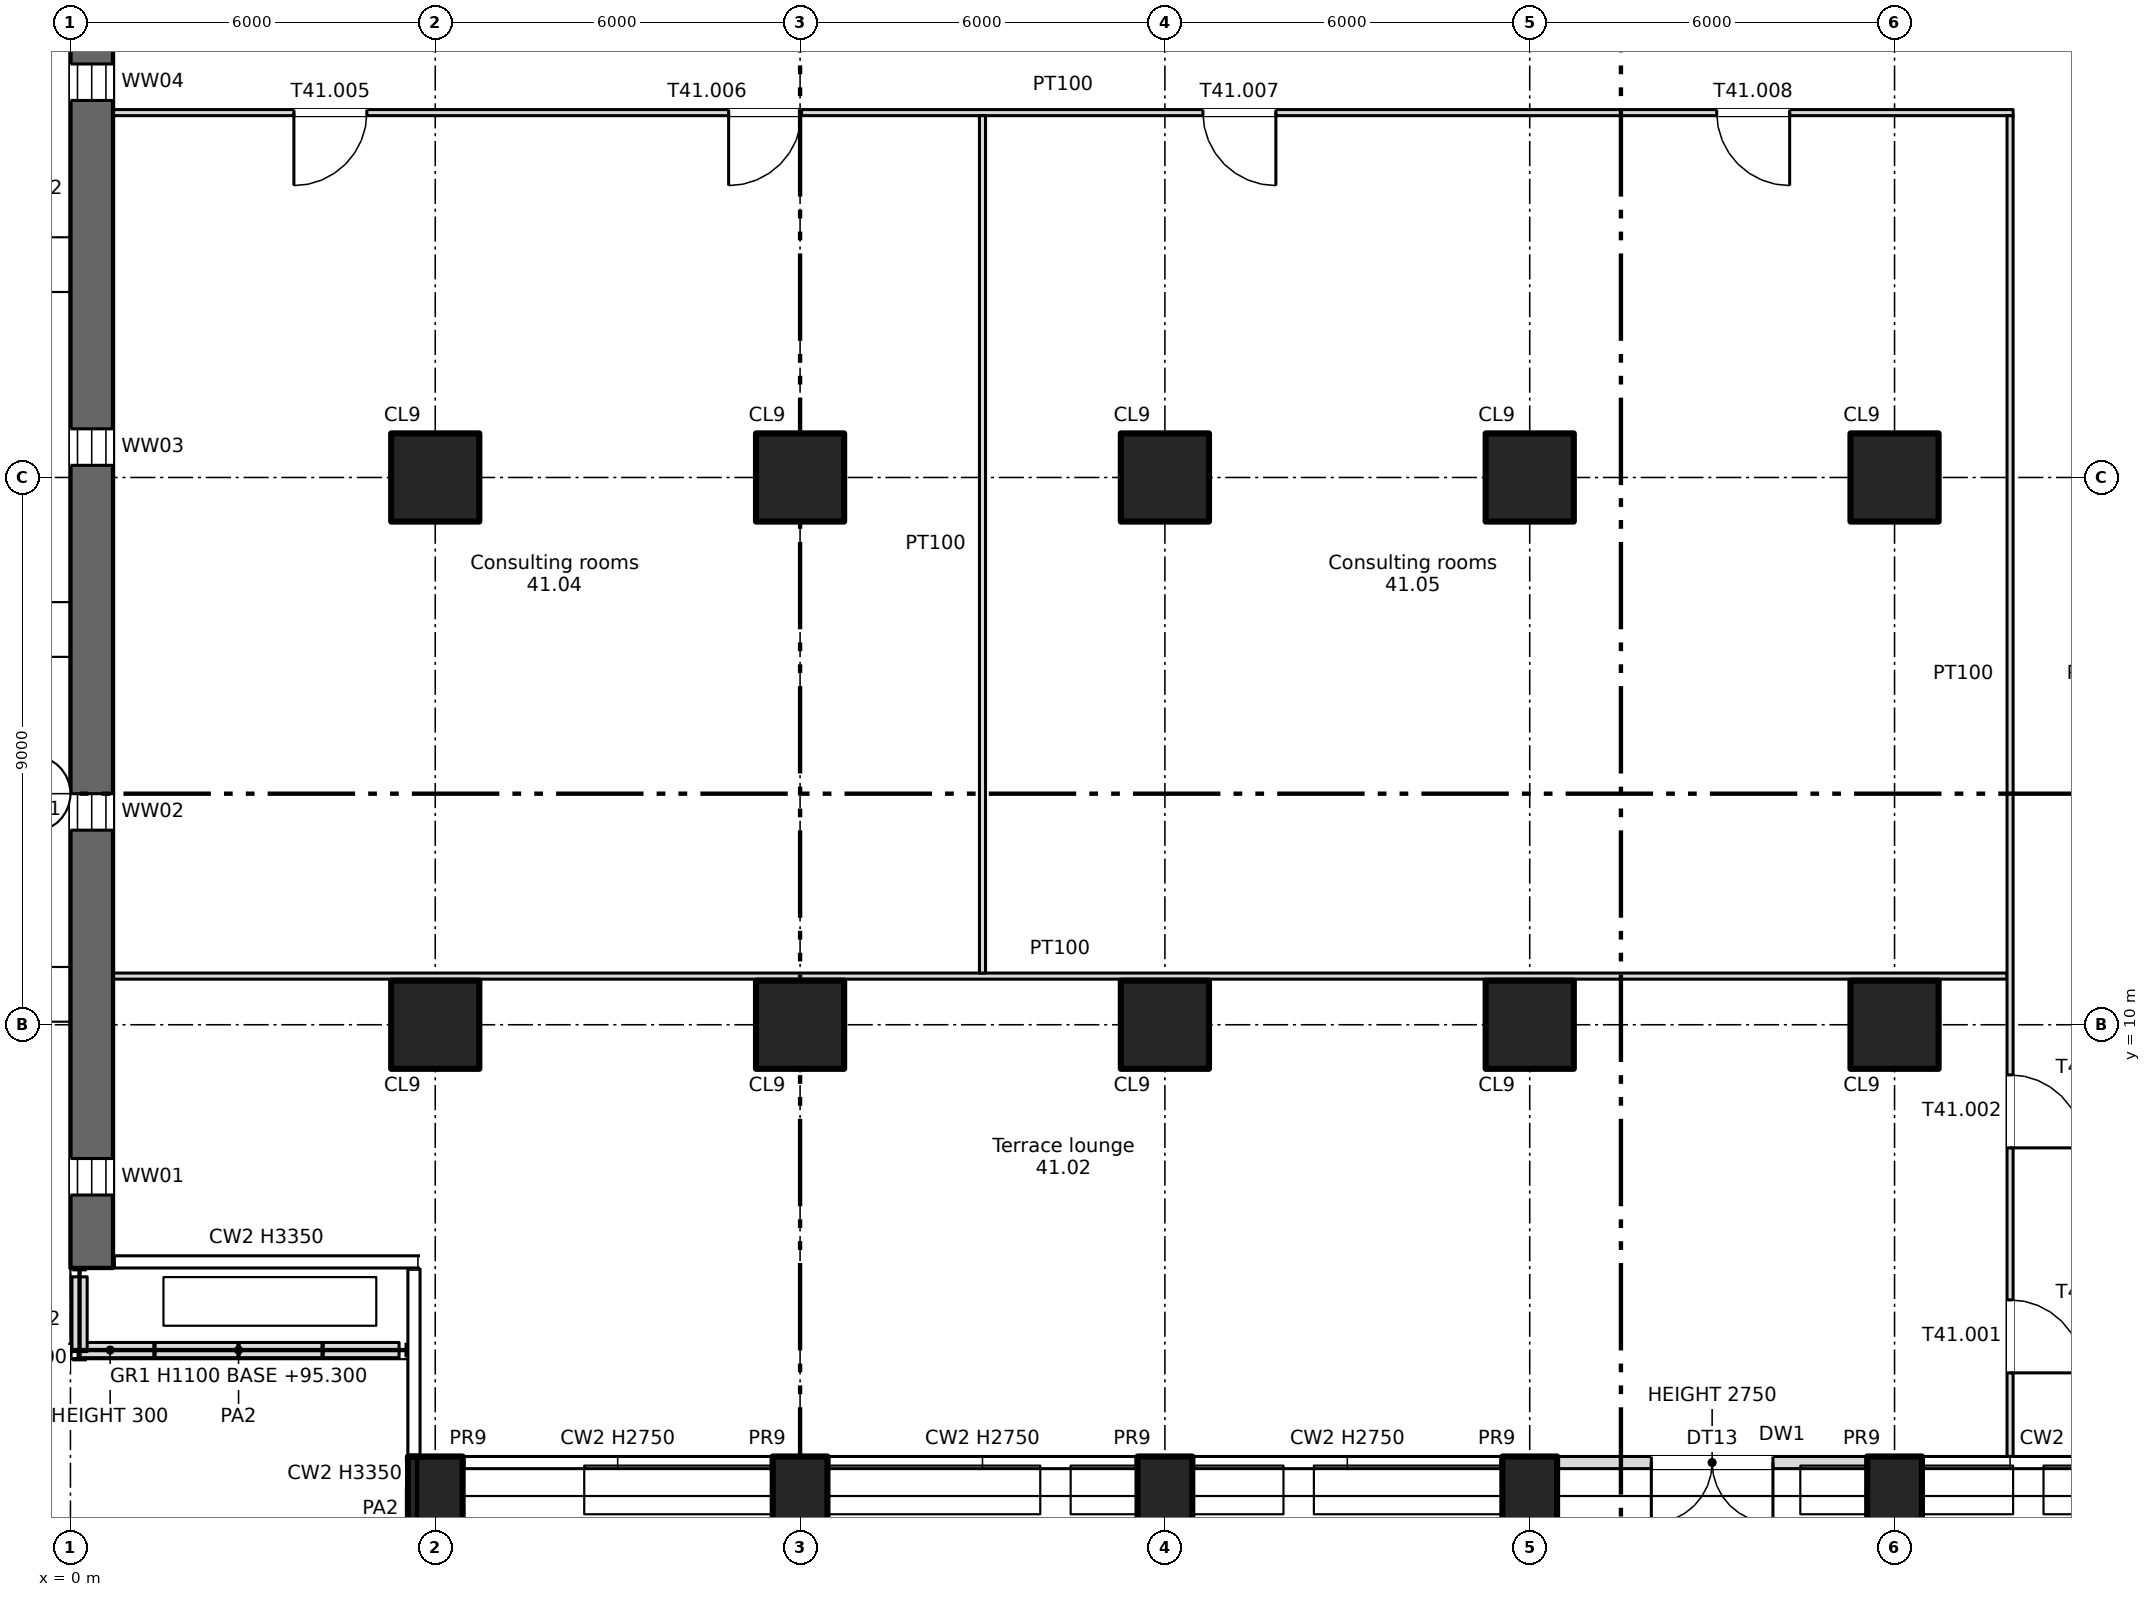
"""IFC4 building model, lengths in metres.
Left out: names, types, materials, properties, quantities, classifications, styles, units other than length and angle.
Written with IfcOpenShell. Run it as: python <this file> out.ifc"""

import sys

from ifc_helpers import new_model, si_unit, direction, frame, frame_2d, origin, origin_2d, place, context, subcontext, project, spatial, rectangle, extrude, element, fill, save


model = new_model("IFC4")
c1 = context("Model", 3, precision=1e-05, world=origin(), true_north=direction((0.0, 1.0)))
c2 = subcontext(c1, "Body", "Model", "MODEL_VIEW")
j1 = project(units=[si_unit("LENGTHUNIT", "METRE"), si_unit("PLANEANGLEUNIT", "RADIAN")], contexts=[c1])
p1 = place(None, origin())
s1 = spatial("IfcSite", under=j1, at=p1, CompositionType="ELEMENT")
p2 = place(p1, origin())
s2 = spatial("IfcBuilding", under=s1, at=p2, CompositionType="ELEMENT")
p3 = place(p2, frame((0.0, 0.0, 95.0)))
s3 = spatial("IfcBuildingStorey", under=s2, at=p3, CompositionType="ELEMENT", Elevation=95.0)
for number, where, z_axis, x_axis in (
    (1, (6.0, 2.2, 0.0), (0.0, 0.0, 1.0), (1.0, 0.0, 0.0)),
    (2, (12.0, 2.2, 0.0), (0.0, 0.0, 1.0), (1.0, 0.0, 0.0)),
    (3, (18.0, 2.2, 0.0), (0.0, 0.0, 1.0), (1.0, 0.0, 0.0)),
    (4, (24.0, 2.2, 0.0), (0.0, 0.0, 1.0), (1.0, 0.0, 0.0)),
    (5, (30.0, 2.2, 0.0), (0.0, 0.0, 1.0), (1.0, 0.0, 0.0)),
):
    element("IfcColumn", number, at=place(p3, frame(where, z_axis=z_axis, x_axis=x_axis)), inside=s3, PredefinedType="COLUMN", context=c2, shape_type="SweptSolid", body=[
        extrude(rectangle(XDim=0.9, YDim=1.4, at=origin_2d()), origin(), (0.0, 0.0, 1.0), 3.35),
    ])
for number, where, z_axis, x_axis in (
    (6, (6.0, 10.0, 0.0), (0.0, 0.0, 1.0), (1.0, 0.0, 0.0)),
    (7, (6.0, 19.0, 0.0), (0.0, 0.0, 1.0), (1.0, 0.0, 0.0)),
    (8, (12.0, 10.0, 0.0), (0.0, 0.0, 1.0), (1.0, 0.0, 0.0)),
    (9, (12.0, 19.0, 0.0), (0.0, 0.0, 1.0), (1.0, 0.0, 0.0)),
    (10, (18.0, 10.0, 0.0), (0.0, 0.0, 1.0), (1.0, 0.0, 0.0)),
    (11, (18.0, 19.0, 0.0), (0.0, 0.0, 1.0), (1.0, 0.0, 0.0)),
    (12, (24.0, 10.0, 0.0), (0.0, 0.0, 1.0), (1.0, 0.0, 0.0)),
    (13, (24.0, 19.0, 0.0), (0.0, 0.0, 1.0), (1.0, 0.0, 0.0)),
    (14, (30.0, 10.0, 0.0), (0.0, 0.0, 1.0), (1.0, 0.0, 0.0)),
    (15, (30.0, 19.0, 0.0), (0.0, 0.0, 1.0), (1.0, 0.0, 0.0)),
):
    element("IfcColumn", number, at=place(p3, frame(where, z_axis=z_axis, x_axis=x_axis)), inside=s3, PredefinedType="COLUMN", context=c2, shape_type="SweptSolid", body=[
        extrude(rectangle(XDim=1.45, YDim=1.45, at=origin_2d()), origin(), (0.0, 0.0, 1.0), 3.35),
    ])
p4 = place(p3, frame((0.35, 6.0, 0.0), z_axis=(0.0, 0.0, 1.0), x_axis=(0.0, 1.0, 0.0)))
e16 = element("IfcWall", 16, at=p4, inside=s3, PredefinedType="SHEAR", context=c2, shape_type="SweptSolid", body=[
    extrude(rectangle(XDim=35.5, YDim=0.7, at=frame_2d((17.75, 0.0))), origin(), (0.0, 0.0, 1.0), 3.35),
])
p5 = place(p4, frame((1.2, 0.0, 0.6)))
e17 = element("IfcOpeningElement", 17, at=p5, cuts=e16, PredefinedType="OPENING", context=c2, shape_type="SweptSolid", body=[
    extrude(rectangle(XDim=0.6, YDim=2.4, at=frame_2d((0.3, 1.2))), frame((0.0, 0.36, 0.0), z_axis=(0.0, -1.0, 0.0), x_axis=(1.0, 0.0, 0.0)), (0.0, 0.0, 1.0), 0.72),
])
p6 = place(p4, frame((7.2, 0.0, 0.6)))
e18 = element("IfcOpeningElement", 18, at=p6, cuts=e16, PredefinedType="OPENING", context=c2, shape_type="SweptSolid", body=[
    extrude(rectangle(XDim=0.6, YDim=2.4, at=frame_2d((0.3, 1.2))), frame((0.0, 0.36, 0.0), z_axis=(0.0, -1.0, 0.0), x_axis=(1.0, 0.0, 0.0)), (0.0, 0.0, 1.0), 0.72),
])
p7 = place(p4, frame((13.2, 0.0, 0.6)))
e19 = element("IfcOpeningElement", 19, at=p7, cuts=e16, PredefinedType="OPENING", context=c2, shape_type="SweptSolid", body=[
    extrude(rectangle(XDim=0.6, YDim=2.4, at=frame_2d((0.3, 1.2))), frame((0.0, 0.36, 0.0), z_axis=(0.0, -1.0, 0.0), x_axis=(1.0, 0.0, 0.0)), (0.0, 0.0, 1.0), 0.72),
])
p8 = place(p4, frame((19.2, 0.0, 0.6)))
e20 = element("IfcOpeningElement", 20, at=p8, cuts=e16, PredefinedType="OPENING", context=c2, shape_type="SweptSolid", body=[
    extrude(rectangle(XDim=0.6, YDim=2.4, at=frame_2d((0.3, 1.2))), frame((0.0, 0.36, 0.0), z_axis=(0.0, -1.0, 0.0), x_axis=(1.0, 0.0, 0.0)), (0.0, 0.0, 1.0), 0.72),
])
p9 = place(p4, frame((25.2, 0.0, 0.6)))
e21 = element("IfcOpeningElement", 21, at=p9, cuts=e16, PredefinedType="OPENING", context=c2, shape_type="SweptSolid", body=[
    extrude(rectangle(XDim=0.6, YDim=2.4, at=frame_2d((0.3, 1.2))), frame((0.0, 0.36, 0.0), z_axis=(0.0, -1.0, 0.0), x_axis=(1.0, 0.0, 0.0)), (0.0, 0.0, 1.0), 0.72),
])
p10 = place(p4, frame((31.2, 0.0, 0.6)))
e22 = element("IfcOpeningElement", 22, at=p10, cuts=e16, PredefinedType="OPENING", context=c2, shape_type="SweptSolid", body=[
    extrude(rectangle(XDim=0.6, YDim=2.4, at=frame_2d((0.3, 1.2))), frame((0.0, 0.36, 0.0), z_axis=(0.0, -1.0, 0.0), x_axis=(1.0, 0.0, 0.0)), (0.0, 0.0, 1.0), 0.72),
])
p11 = place(p3, frame((24.45, 2.8, 0.0), z_axis=(0.0, 0.0, 1.0), x_axis=(1.0, 0.0, 0.0)))
e23 = element("IfcWall", 23, at=p11, inside=s3, PredefinedType="SOLIDWALL", context=c2, shape_type="SweptSolid", body=[
    extrude(rectangle(XDim=5.1, YDim=0.2, at=frame_2d((2.55, 0.0))), origin(), (0.0, 0.0, 1.0), 2.75),
])
p12 = place(p11, frame((1.55, 0.0, 0.0)))
e24 = element("IfcOpeningElement", 24, at=p12, cuts=e23, PredefinedType="OPENING", context=c2, shape_type="SweptSolid", body=[
    extrude(rectangle(XDim=2.0, YDim=2.4, at=frame_2d((1.0, 1.2))), frame((0.0, 0.11, 0.0), z_axis=(0.0, -1.0, 0.0), x_axis=(1.0, 0.0, 0.0)), (0.0, 0.0, 1.0), 0.22),
])
p13 = place(p3, frame((5.405, 4.65, 0.0), z_axis=(0.0, 0.0, 1.0), x_axis=(-1.0, 0.0, 0.0)))
e25 = element("IfcWall", 25, at=p13, inside=s3, PredefinedType="PARAPET", context=c2, shape_type="SweptSolid", body=[
    extrude(rectangle(XDim=5.28, YDim=0.25, at=frame_2d((2.64, 0.0))), origin(), (0.0, 0.0, 1.0), 0.3),
])
for number, where, z_axis, x_axis in (
    (26, (0.15, 4.625, 0.0), (0.0, 0.0, 1.0), (0.0, 1.0, 0.0)),
    (27, (5.7, 1.525, 0.0), (0.0, 0.0, 1.0), (0.0, 1.0, 0.0)),
):
    element("IfcWall", number, at=place(p3, frame(where, z_axis=z_axis, x_axis=x_axis)), inside=s3, PredefinedType="PARAPET", context=c2, shape_type="SweptSolid", body=[
        extrude(rectangle(XDim=1.23, YDim=0.25, at=frame_2d((0.615, 0.0))), origin(), (0.0, 0.0, 1.0), 0.3),
    ])
p14 = place(p3, frame((0.7, 10.8, 0.0), z_axis=(0.0, 0.0, 1.0), x_axis=(1.0, 0.0, 0.0)))
e28 = element("IfcWall", 28, at=p14, inside=s3, PredefinedType="PARTITIONING", context=c2, shape_type="SweptSolid", body=[
    extrude(rectangle(XDim=31.15, YDim=0.1, at=frame_2d((15.575, 0.0))), origin(), (0.0, 0.0, 1.0), 3.35),
])
p15 = place(p3, frame((0.7, 25.0, 0.0), z_axis=(0.0, 0.0, 1.0), x_axis=(1.0, 0.0, 0.0)))
e29 = element("IfcWall", 29, at=p15, inside=s3, PredefinedType="PARTITIONING", context=c2, shape_type="SweptSolid", body=[
    extrude(rectangle(XDim=31.25, YDim=0.1, at=frame_2d((15.625, 0.0))), origin(), (0.0, 0.0, 1.0), 3.35),
])
p16 = place(p15, frame((2.975, 0.0, 0.0)))
e30 = element("IfcOpeningElement", 30, at=p16, cuts=e29, PredefinedType="OPENING", context=c2, shape_type="SweptSolid", body=[
    extrude(rectangle(XDim=1.2, YDim=2.1, at=frame_2d((0.6, 1.05))), frame((0.0, 0.06, 0.0), z_axis=(0.0, -1.0, 0.0), x_axis=(1.0, 0.0, 0.0)), (0.0, 0.0, 1.0), 0.12),
])
p17 = place(p15, frame((10.125, 0.0, 0.0)))
e31 = element("IfcOpeningElement", 31, at=p17, cuts=e29, PredefinedType="OPENING", context=c2, shape_type="SweptSolid", body=[
    extrude(rectangle(XDim=1.2, YDim=2.1, at=frame_2d((0.6, 1.05))), frame((0.0, 0.06, 0.0), z_axis=(0.0, -1.0, 0.0), x_axis=(1.0, 0.0, 0.0)), (0.0, 0.0, 1.0), 0.12),
])
p18 = place(p15, frame((17.925, 0.0, 0.0)))
e32 = element("IfcOpeningElement", 32, at=p18, cuts=e29, PredefinedType="OPENING", context=c2, shape_type="SweptSolid", body=[
    extrude(rectangle(XDim=1.2, YDim=2.1, at=frame_2d((0.6, 1.05))), frame((0.0, 0.06, 0.0), z_axis=(0.0, -1.0, 0.0), x_axis=(1.0, 0.0, 0.0)), (0.0, 0.0, 1.0), 0.12),
])
p19 = place(p15, frame((26.375, 0.0, 0.0)))
e33 = element("IfcOpeningElement", 33, at=p19, cuts=e29, PredefinedType="OPENING", context=c2, shape_type="SweptSolid", body=[
    extrude(rectangle(XDim=1.2, YDim=2.1, at=frame_2d((0.6, 1.05))), frame((0.0, 0.06, 0.0), z_axis=(0.0, -1.0, 0.0), x_axis=(1.0, 0.0, 0.0)), (0.0, 0.0, 1.0), 0.12),
])
p20 = place(p3, frame((15.0, 10.85, 0.0), z_axis=(0.0, 0.0, 1.0), x_axis=(0.0, 1.0, 0.0)))
e34 = element("IfcWall", 34, at=p20, inside=s3, PredefinedType="PARTITIONING", context=c2, shape_type="SweptSolid", body=[
    extrude(rectangle(XDim=14.1, YDim=0.1, at=frame_2d((7.05, 0.0))), origin(), (0.0, 0.0, 1.0), 3.35),
])
p21 = place(p3, frame((31.9, 2.9, 0.0), z_axis=(0.0, 0.0, 1.0), x_axis=(0.0, 1.0, 0.0)))
e35 = element("IfcWall", 35, at=p21, inside=s3, PredefinedType="PARTITIONING", context=c2, shape_type="SweptSolid", body=[
    extrude(rectangle(XDim=22.05, YDim=0.1, at=frame_2d((11.025, 0.0))), origin(), (0.0, 0.0, 1.0), 3.35),
])
p22 = place(p21, frame((1.375, 0.0, 0.0)))
e36 = element("IfcOpeningElement", 36, at=p22, cuts=e35, PredefinedType="OPENING", context=c2, shape_type="SweptSolid", body=[
    extrude(rectangle(XDim=1.2, YDim=2.1, at=frame_2d((0.6, 1.05))), frame((0.0, 0.06, 0.0), z_axis=(0.0, -1.0, 0.0), x_axis=(1.0, 0.0, 0.0)), (0.0, 0.0, 1.0), 0.12),
])
p23 = place(p21, frame((5.075, 0.0, 0.0)))
e37 = element("IfcOpeningElement", 37, at=p23, cuts=e35, PredefinedType="OPENING", context=c2, shape_type="SweptSolid", body=[
    extrude(rectangle(XDim=1.2, YDim=2.1, at=frame_2d((0.6, 1.05))), frame((0.0, 0.06, 0.0), z_axis=(0.0, -1.0, 0.0), x_axis=(1.0, 0.0, 0.0)), (0.0, 0.0, 1.0), 0.12),
])
p24 = place(p5, origin())
e38 = element("IfcWindow", 38, at=p24, inside=s3, PartitioningType="SINGLE_PANEL", PredefinedType="WINDOW", context=c2, shape_type="SweptSolid", body=[
    extrude(rectangle(XDim=0.6, YDim=2.4, at=frame_2d((0.3, 1.2))), frame((0.0, 0.03, 0.0), z_axis=(0.0, -1.0, 0.0), x_axis=(1.0, 0.0, 0.0)), (0.0, 0.0, 1.0), 0.06),
])
fill(e17, e38)
p25 = place(p6, origin())
e39 = element("IfcWindow", 39, at=p25, inside=s3, PartitioningType="SINGLE_PANEL", PredefinedType="WINDOW", context=c2, shape_type="SweptSolid", body=[
    extrude(rectangle(XDim=0.6, YDim=2.4, at=frame_2d((0.3, 1.2))), frame((0.0, 0.03, 0.0), z_axis=(0.0, -1.0, 0.0), x_axis=(1.0, 0.0, 0.0)), (0.0, 0.0, 1.0), 0.06),
])
fill(e18, e39)
p26 = place(p7, origin())
e40 = element("IfcWindow", 40, at=p26, inside=s3, PartitioningType="SINGLE_PANEL", PredefinedType="WINDOW", context=c2, shape_type="SweptSolid", body=[
    extrude(rectangle(XDim=0.6, YDim=2.4, at=frame_2d((0.3, 1.2))), frame((0.0, 0.03, 0.0), z_axis=(0.0, -1.0, 0.0), x_axis=(1.0, 0.0, 0.0)), (0.0, 0.0, 1.0), 0.06),
])
fill(e19, e40)
p27 = place(p8, origin())
e41 = element("IfcWindow", 41, at=p27, inside=s3, PartitioningType="SINGLE_PANEL", PredefinedType="WINDOW", context=c2, shape_type="SweptSolid", body=[
    extrude(rectangle(XDim=0.6, YDim=2.4, at=frame_2d((0.3, 1.2))), frame((0.0, 0.03, 0.0), z_axis=(0.0, -1.0, 0.0), x_axis=(1.0, 0.0, 0.0)), (0.0, 0.0, 1.0), 0.06),
])
fill(e20, e41)
p28 = place(p12, frame((2.0, 0.0, 0.0), z_axis=(0.0, 0.0, 1.0), x_axis=(-1.0, 0.0, 0.0)))
e42 = element("IfcDoor", 42, at=p28, inside=s3, OperationType="DOUBLE_DOOR_SINGLE_SWING", PredefinedType="DOOR", context=c2, shape_type="SweptSolid", body=[
    extrude(rectangle(XDim=2.0, YDim=2.4, at=frame_2d((1.0, 1.2))), frame((0.0, 0.025, 0.0), z_axis=(0.0, -1.0, 0.0), x_axis=(1.0, 0.0, 0.0)), (0.0, 0.0, 1.0), 0.05),
])
fill(e24, e42)
p29 = place(p22, origin())
e43 = element("IfcDoor", 43, at=p29, inside=s3, OperationType="SINGLE_SWING_LEFT", PredefinedType="DOOR", context=c2, shape_type="SweptSolid", body=[
    extrude(rectangle(XDim=1.2, YDim=2.1, at=frame_2d((0.6, 1.05))), frame((0.0, 0.025, 0.0), z_axis=(0.0, -1.0, 0.0), x_axis=(1.0, 0.0, 0.0)), (0.0, 0.0, 1.0), 0.05),
])
fill(e36, e43)
p30 = place(p23, origin())
e44 = element("IfcDoor", 44, at=p30, inside=s3, OperationType="SINGLE_SWING_LEFT", PredefinedType="DOOR", context=c2, shape_type="SweptSolid", body=[
    extrude(rectangle(XDim=1.2, YDim=2.1, at=frame_2d((0.6, 1.05))), frame((0.0, 0.025, 0.0), z_axis=(0.0, -1.0, 0.0), x_axis=(1.0, 0.0, 0.0)), (0.0, 0.0, 1.0), 0.05),
])
fill(e37, e44)
p31 = place(p16, origin())
e45 = element("IfcDoor", 45, at=p31, inside=s3, OperationType="SINGLE_SWING_LEFT", PredefinedType="DOOR", context=c2, shape_type="SweptSolid", body=[
    extrude(rectangle(XDim=1.2, YDim=2.1, at=frame_2d((0.6, 1.05))), frame((0.0, 0.025, 0.0), z_axis=(0.0, -1.0, 0.0), x_axis=(1.0, 0.0, 0.0)), (0.0, 0.0, 1.0), 0.05),
])
fill(e30, e45)
p32 = place(p17, origin())
e46 = element("IfcDoor", 46, at=p32, inside=s3, OperationType="SINGLE_SWING_LEFT", PredefinedType="DOOR", context=c2, shape_type="SweptSolid", body=[
    extrude(rectangle(XDim=1.2, YDim=2.1, at=frame_2d((0.6, 1.05))), frame((0.0, 0.025, 0.0), z_axis=(0.0, -1.0, 0.0), x_axis=(1.0, 0.0, 0.0)), (0.0, 0.0, 1.0), 0.05),
])
fill(e31, e46)
p33 = place(p18, origin())
e47 = element("IfcDoor", 47, at=p33, inside=s3, OperationType="SINGLE_SWING_RIGHT", PredefinedType="DOOR", context=c2, shape_type="SweptSolid", body=[
    extrude(rectangle(XDim=1.2, YDim=2.1, at=frame_2d((0.6, 1.05))), frame((0.0, 0.025, 0.0), z_axis=(0.0, -1.0, 0.0), x_axis=(1.0, 0.0, 0.0)), (0.0, 0.0, 1.0), 0.05),
])
fill(e32, e47)
p34 = place(p19, origin())
e48 = element("IfcDoor", 48, at=p34, inside=s3, OperationType="SINGLE_SWING_RIGHT", PredefinedType="DOOR", context=c2, shape_type="SweptSolid", body=[
    extrude(rectangle(XDim=1.2, YDim=2.1, at=frame_2d((0.6, 1.05))), frame((0.0, 0.025, 0.0), z_axis=(0.0, -1.0, 0.0), x_axis=(1.0, 0.0, 0.0)), (0.0, 0.0, 1.0), 0.05),
])
fill(e33, e48)
save(model, sys.argv[1])
